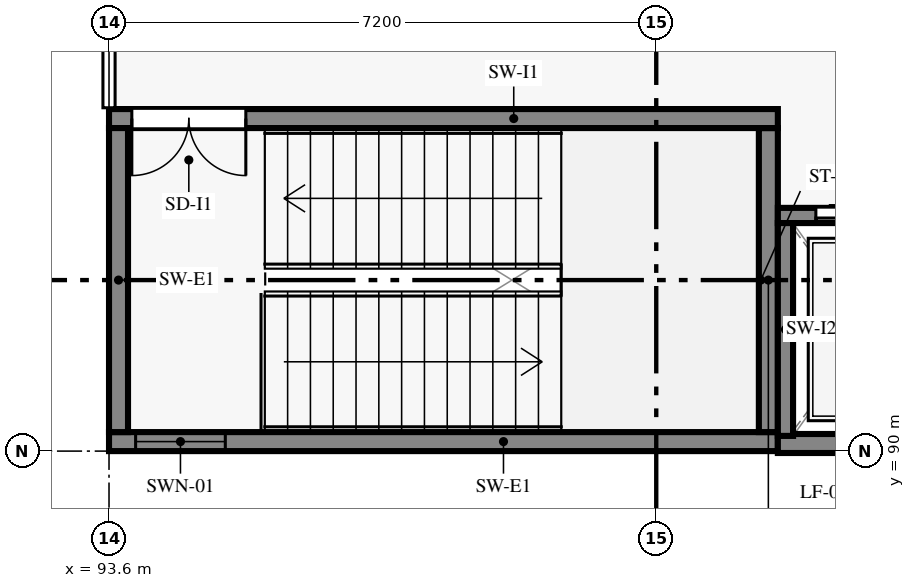
"""IFC4 building model, lengths in metres.
Left out: names, types, materials, properties, quantities, classifications, styles, units other than length and angle.
Written with IfcOpenShell. Run it as: python <this file> out.ifc"""

import sys

from ifc_helpers import new_model, si_unit, direction, frame, frame_2d, origin, place, context, subcontext, project, spatial, rectangle, extrude, element, fill, save


model = new_model("IFC4")
c1 = context("Model", 3, precision=1e-05, world=origin(), true_north=direction((0.0, 1.0)))
c2 = subcontext(c1, "Body", "Model", "MODEL_VIEW")
j1 = project(units=[si_unit("LENGTHUNIT", "METRE"), si_unit("PLANEANGLEUNIT", "RADIAN")], contexts=[c1])
p1 = place(None, origin())
s1 = spatial("IfcSite", under=j1, at=p1, CompositionType="ELEMENT")
p2 = place(p1, origin())
s2 = spatial("IfcBuilding", under=s1, at=p2, CompositionType="ELEMENT")
p3 = place(p2, frame((0.0, 0.0, 9.6)))
s3 = spatial("IfcBuildingStorey", under=s2, at=p3, CompositionType="ELEMENT", Elevation=9.6)
p4 = place(p3, frame((93.6, 90.125, 0.0), z_axis=(0.0, 0.0, 1.0), x_axis=(1.0, 0.0, 0.0)))
e1 = element("IfcWall", 1, at=p4, inside=s3, PredefinedType="SHEAR", context=c2, shape_type="SweptSolid", body=[
    extrude(rectangle(XDim=8.8, YDim=0.25, at=frame_2d((4.4, 0.0))), origin(), (0.0, 0.0, 1.0), 3.925),
])
p5 = place(p4, frame((0.35, 0.0, 0.92)))
e2 = element("IfcOpeningElement", 2, at=p5, cuts=e1, PredefinedType="OPENING", context=c2, shape_type="SweptSolid", body=[
    extrude(rectangle(XDim=1.18, YDim=1.48, at=frame_2d((0.59, 0.74))), frame((0.0, 0.135, 0.0), z_axis=(0.0, -1.0, 0.0), x_axis=(1.0, 0.0, 0.0)), (0.0, 0.0, 1.0), 0.27),
])
p6 = place(p3, frame((102.275, 90.25, 0.0), z_axis=(0.0, 0.0, 1.0), x_axis=(0.0, 1.0, 0.0)))
e3 = element("IfcWall", 3, at=p6, inside=s3, PredefinedType="SHEAR", context=c2, shape_type="SweptSolid", body=[
    extrude(rectangle(XDim=4.0, YDim=0.25, at=frame_2d((2.0, 0.0))), origin(), (0.0, 0.0, 1.0), 3.925),
])
p7 = place(p3, frame((102.4, 94.375, 0.0), z_axis=(0.0, 0.0, 1.0), x_axis=(-1.0, 0.0, 0.0)))
e4 = element("IfcWall", 4, at=p7, inside=s3, PredefinedType="SHEAR", context=c2, shape_type="SweptSolid", body=[
    extrude(rectangle(XDim=8.8, YDim=0.25, at=frame_2d((4.4, 0.0))), origin(), (0.0, 0.0, 1.0), 3.925),
])
p8 = place(p7, frame((7.0, 0.0, 0.0)))
e5 = element("IfcOpeningElement", 5, at=p8, cuts=e4, PredefinedType="OPENING", context=c2, shape_type="SweptSolid", body=[
    extrude(rectangle(XDim=1.5, YDim=2.15, at=frame_2d((0.75, 1.075))), frame((0.0, 0.135, 0.0), z_axis=(0.0, -1.0, 0.0), x_axis=(1.0, 0.0, 0.0)), (0.0, 0.0, 1.0), 0.27),
])
p9 = place(p3, frame((93.725, 94.25, 0.0), z_axis=(0.0, 0.0, 1.0), x_axis=(0.0, -1.0, 0.0)))
e6 = element("IfcWall", 6, at=p9, inside=s3, PredefinedType="SHEAR", context=c2, shape_type="SweptSolid", body=[
    extrude(rectangle(XDim=4.0, YDim=0.25, at=frame_2d((2.0, 0.0))), origin(), (0.0, 0.0, 1.0), 3.925),
])
p10 = place(p3, frame((102.4, 90.1, 0.0), z_axis=(0.0, 0.0, 1.0), x_axis=(1.0, 0.0, 0.0)))
e7 = element("IfcWall", 7, at=p10, inside=s3, PredefinedType="SHEAR", context=c2, shape_type="SweptSolid", body=[
    extrude(rectangle(XDim=2.4, YDim=0.25, at=frame_2d((1.2, 0.0))), origin(), (0.0, 0.0, 1.0), 3.925),
])
p11 = place(p3, frame((104.8, 93.1, 0.0), z_axis=(0.0, 0.0, 1.0), x_axis=(-1.0, 0.0, 0.0)))
e8 = element("IfcWall", 8, at=p11, inside=s3, PredefinedType="SHEAR", context=c2, shape_type="SweptSolid", body=[
    extrude(rectangle(XDim=2.4, YDim=0.2, at=frame_2d((1.2, 0.0))), origin(), (0.0, 0.0, 1.0), 3.925),
])
p12 = place(p11, frame((0.5, 0.0, 0.0)))
e9 = element("IfcOpeningElement", 9, at=p12, cuts=e8, PredefinedType="OPENING", context=c2, shape_type="SweptSolid", body=[
    extrude(rectangle(XDim=1.4, YDim=2.15, at=frame_2d((0.7, 1.075))), frame((0.0, 0.11, 0.0), z_axis=(0.0, -1.0, 0.0), x_axis=(1.0, 0.0, 0.0)), (0.0, 0.0, 1.0), 0.22),
])
p13 = place(p3, frame((102.5, 93.0, 0.0), z_axis=(0.0, 0.0, 1.0), x_axis=(0.0, -1.0, 0.0)))
e10 = element("IfcWall", 10, at=p13, inside=s3, PredefinedType="SHEAR", context=c2, shape_type="SweptSolid", body=[
    extrude(rectangle(XDim=2.8, YDim=0.2, at=frame_2d((1.4, 0.0))), origin(), (0.0, 0.0, 1.0), 3.925),
])
p14 = place(p5, origin())
e11 = element("IfcWindow", 11, at=p14, inside=s3, PartitioningType="SINGLE_PANEL", PredefinedType="WINDOW", context=c2, shape_type="SweptSolid", body=[
    extrude(rectangle(XDim=1.18, YDim=1.48, at=frame_2d((0.59, 0.74))), frame((0.0, 0.03, 0.0), z_axis=(0.0, -1.0, 0.0), x_axis=(1.0, 0.0, 0.0)), (0.0, 0.0, 1.0), 0.06),
])
fill(e2, e11)
p15 = place(p8, origin())
e12 = element("IfcDoor", 12, at=p15, inside=s3, OperationType="DOUBLE_DOOR_SINGLE_SWING", PredefinedType="DOOR", context=c2, shape_type="SweptSolid", body=[
    extrude(rectangle(XDim=1.5, YDim=2.15, at=frame_2d((0.75, 1.075))), frame((0.0, 0.025, 0.0), z_axis=(0.0, -1.0, 0.0), x_axis=(1.0, 0.0, 0.0)), (0.0, 0.0, 1.0), 0.05),
])
fill(e5, e12)
p16 = place(p12, frame((1.4, 0.0, 0.0), z_axis=(0.0, 0.0, 1.0), x_axis=(-1.0, 0.0, 0.0)))
e13 = element("IfcDoor", 13, at=p16, inside=s3, OperationType="DOUBLE_DOOR_SLIDING", PredefinedType="DOOR", context=c2, shape_type="SweptSolid", body=[
    extrude(rectangle(XDim=1.4, YDim=2.15, at=frame_2d((0.7, 1.075))), frame((0.0, 0.025, 0.0), z_axis=(0.0, -1.0, 0.0), x_axis=(1.0, 0.0, 0.0)), (0.0, 0.0, 1.0), 0.05),
])
fill(e9, e13)
save(model, sys.argv[1])
